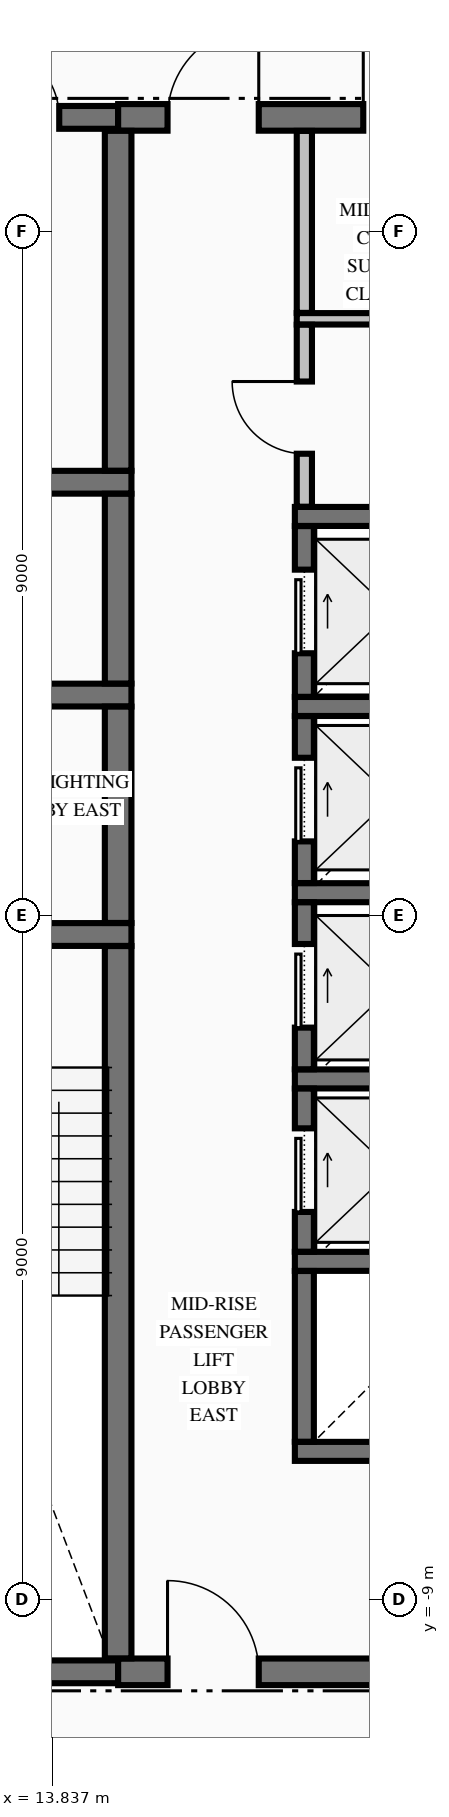
"""IFC4 building model, lengths in metres.
Left out: names, types, materials, properties, quantities, classifications, styles, units other than length and angle.
Written with IfcOpenShell. Run it as: python <this file> out.ifc"""

import sys

from ifc_helpers import new_model, si_unit, direction, frame, frame_2d, origin, place, context, subcontext, project, spatial, rectangle, extrude, element, fill, save


model = new_model("IFC4")
c1 = context("Model", 3, precision=1e-05, world=origin(), true_north=direction((0.0, 1.0)))
c2 = subcontext(c1, "Body", "Model", "MODEL_VIEW")
j1 = project(units=[si_unit("LENGTHUNIT", "METRE"), si_unit("PLANEANGLEUNIT", "RADIAN")], contexts=[c1])
p1 = place(None, origin())
s1 = spatial("IfcSite", under=j1, at=p1, CompositionType="ELEMENT")
p2 = place(p1, origin())
s2 = spatial("IfcBuilding", under=s1, at=p2, CompositionType="ELEMENT")
p3 = place(p2, frame((0.0, 0.0, 124.92)))
s3 = spatial("IfcBuildingStorey", under=s2, at=p3, CompositionType="ELEMENT", Elevation=124.92)
p4 = place(p3, frame((11.504, -9.95, 0.0), z_axis=(0.0, 0.0, 1.0), x_axis=(1.0, 0.0, 0.0)))
e1 = element("IfcWall", 1, at=p4, inside=s3, PredefinedType="SHEAR", context=c2, shape_type="SweptSolid", body=[
    extrude(rectangle(XDim=3.196, YDim=0.3, at=frame_2d((1.598, 0.0))), origin(), (0.0, 0.0, 1.0), 3.32),
])
p5 = place(p3, frame((14.7, -9.95, 0.0), z_axis=(0.0, 0.0, 1.0), x_axis=(1.0, 0.0, 0.0)))
e2 = element("IfcWall", 2, at=p5, inside=s3, PredefinedType="SHEAR", context=c2, shape_type="SweptSolid", body=[
    extrude(rectangle(XDim=4.796, YDim=0.35, at=frame_2d((2.398, 0.0))), origin(), (0.0, 0.0, 1.0), 3.32),
])
p6 = place(p5, frame((0.65, 0.0, 0.0)))
e3 = element("IfcOpeningElement", 3, at=p6, cuts=e2, PredefinedType="OPENING", context=c2, shape_type="SweptSolid", body=[
    extrude(rectangle(XDim=1.2, YDim=2.15, at=frame_2d((0.6, 1.075))), frame((0.0, 0.185, 0.0), z_axis=(0.0, -1.0, 0.0), x_axis=(1.0, 0.0, 0.0)), (0.0, 0.0, 1.0), 0.37),
])
for number, where, z_axis, x_axis in (
    (4, (17.025, -7.05, 0.0), (0.0, 0.0, 1.0), (1.0, 0.0, 0.0)),
    (5, (17.025, -4.55, 0.0), (0.0, 0.0, 1.0), (1.0, 0.0, 0.0)),
    (6, (17.025, -2.15, 0.0), (0.0, 0.0, 1.0), (1.0, 0.0, 0.0)),
):
    element("IfcWall", number, at=place(p3, frame(where, z_axis=z_axis, x_axis=x_axis)), inside=s3, PredefinedType="SOLIDWALL", context=c2, shape_type="SweptSolid", body=[
        extrude(rectangle(XDim=3.15, YDim=0.25, at=frame_2d((1.575, 0.0))), origin(), (0.0, 0.0, 1.0), 3.32),
    ])
p7 = place(p3, frame((11.504, -0.25, 0.0), z_axis=(0.0, 0.0, 1.0), x_axis=(1.0, 0.0, 0.0)))
e7 = element("IfcWall", 7, at=p7, inside=s3, PredefinedType="SHEAR", context=c2, shape_type="SweptSolid", body=[
    extrude(rectangle(XDim=3.371, YDim=0.3, at=frame_2d((1.686, 0.0))), origin(), (0.0, 0.0, 1.0), 3.32),
])
p8 = place(p7, frame((1.096, 0.0, 0.0)))
e8 = element("IfcOpeningElement", 8, at=p8, cuts=e7, PredefinedType="OPENING", context=c2, shape_type="SweptSolid", body=[
    extrude(rectangle(XDim=1.1, YDim=2.15, at=frame_2d((0.55, 1.075))), frame((0.0, 0.16, 0.0), z_axis=(0.0, -1.0, 0.0), x_axis=(1.0, 0.0, 0.0)), (0.0, 0.0, 1.0), 0.32),
])
p9 = place(p3, frame((17.025, 0.3, 0.0), z_axis=(0.0, 0.0, 1.0), x_axis=(1.0, 0.0, 0.0)))
e9 = element("IfcWall", 9, at=p9, inside=s3, PredefinedType="SOLIDWALL", context=c2, shape_type="SweptSolid", body=[
    extrude(rectangle(XDim=2.471, YDim=0.25, at=frame_2d((1.236, 0.0))), origin(), (0.0, 0.0, 1.0), 3.32),
])
p10 = place(p3, frame((17.025, 2.75, 0.0), z_axis=(0.0, 0.0, 1.0), x_axis=(1.0, 0.0, 0.0)))
e10 = element("IfcWall", 10, at=p10, inside=s3, PredefinedType="SOLIDWALL", context=c2, shape_type="SweptSolid", body=[
    extrude(rectangle(XDim=3.15, YDim=0.25, at=frame_2d((1.575, 0.0))), origin(), (0.0, 0.0, 1.0), 3.32),
])
p11 = place(p3, frame((10.85, 2.9, 0.0), z_axis=(0.0, 0.0, 1.0), x_axis=(1.0, 0.0, 0.0)))
e11 = element("IfcWall", 11, at=p11, inside=s3, PredefinedType="SHEAR", context=c2, shape_type="SweptSolid", body=[
    extrude(rectangle(XDim=4.025, YDim=0.3, at=frame_2d((2.012, 0.0))), origin(), (0.0, 0.0, 1.0), 3.32),
])
p12 = place(p11, frame((0.85, 0.0, 0.0)))
e12 = element("IfcOpeningElement", 12, at=p12, cuts=e11, PredefinedType="OPENING", context=c2, shape_type="SweptSolid", body=[
    extrude(rectangle(XDim=1.1, YDim=2.2, at=frame_2d((0.55, 1.1))), frame((0.0, 0.16, 0.0), z_axis=(0.0, -1.0, 0.0), x_axis=(1.0, 0.0, 0.0)), (0.0, 0.0, 1.0), 0.32),
])
p13 = place(p3, frame((17.025, 5.25, 0.0), z_axis=(0.0, 0.0, 1.0), x_axis=(1.0, 0.0, 0.0)))
e13 = element("IfcWall", 13, at=p13, inside=s3, PredefinedType="SOLIDWALL", context=c2, shape_type="SweptSolid", body=[
    extrude(rectangle(XDim=3.15, YDim=0.25, at=frame_2d((1.575, 0.0))), origin(), (0.0, 0.0, 1.0), 3.32),
])
p14 = place(p3, frame((10.85, 5.7, 0.0), z_axis=(0.0, 0.0, 1.0), x_axis=(1.0, 0.0, 0.0)))
e14 = element("IfcWall", 14, at=p14, inside=s3, PredefinedType="SHEAR", context=c2, shape_type="SweptSolid", body=[
    extrude(rectangle(XDim=4.025, YDim=0.3, at=frame_2d((2.012, 0.0))), origin(), (0.0, 0.0, 1.0), 3.32),
])
p15 = place(p3, frame((11.504, 10.5, 0.0), z_axis=(0.0, 0.0, 1.0), x_axis=(1.0, 0.0, 0.0)))
e15 = element("IfcWall", 15, at=p15, inside=s3, PredefinedType="SHEAR", context=c2, shape_type="SweptSolid", body=[
    extrude(rectangle(XDim=3.196, YDim=0.3, at=frame_2d((1.598, 0.0))), origin(), (0.0, 0.0, 1.0), 3.32),
])
p16 = place(p15, frame((1.471, 0.0, 0.0)))
e16 = element("IfcOpeningElement", 16, at=p16, cuts=e15, PredefinedType="OPENING", context=c2, shape_type="SweptSolid", body=[
    extrude(rectangle(XDim=0.95, YDim=2.15, at=frame_2d((0.475, 1.075))), frame((0.0, 0.16, 0.0), z_axis=(0.0, -1.0, 0.0), x_axis=(1.0, 0.0, 0.0)), (0.0, 0.0, 1.0), 0.32),
])
p17 = place(p3, frame((14.7, 10.5, 0.0), z_axis=(0.0, 0.0, 1.0), x_axis=(1.0, 0.0, 0.0)))
e17 = element("IfcWall", 17, at=p17, inside=s3, PredefinedType="SHEAR", context=c2, shape_type="SweptSolid", body=[
    extrude(rectangle(XDim=4.796, YDim=0.35, at=frame_2d((2.398, 0.0))), origin(), (0.0, 0.0, 1.0), 3.32),
])
p18 = place(p17, frame((0.65, 0.0, 0.0)))
e18 = element("IfcOpeningElement", 18, at=p18, cuts=e17, PredefinedType="OPENING", context=c2, shape_type="SweptSolid", body=[
    extrude(rectangle(XDim=1.2, YDim=2.15, at=frame_2d((0.6, 1.075))), frame((0.0, 0.185, 0.0), z_axis=(0.0, -1.0, 0.0), x_axis=(1.0, 0.0, 0.0)), (0.0, 0.0, 1.0), 0.37),
])
p19 = place(p17, frame((3.225, 0.0, 0.0)))
e19 = element("IfcOpeningElement", 19, at=p19, cuts=e17, PredefinedType="OPENING", context=c2, shape_type="SweptSolid", body=[
    extrude(rectangle(XDim=0.95, YDim=2.15, at=frame_2d((0.475, 1.075))), frame((0.0, 0.185, 0.0), z_axis=(0.0, -1.0, 0.0), x_axis=(1.0, 0.0, 0.0)), (0.0, 0.0, 1.0), 0.37),
])
p20 = place(p3, frame((17.05, 7.85, 0.0), z_axis=(0.0, 0.0, 1.0), x_axis=(1.0, 0.0, 0.0)))
e20 = element("IfcWall", 20, at=p20, inside=s3, PredefinedType="PARTITIONING", context=c2, shape_type="SweptSolid", body=[
    extrude(rectangle(XDim=2.772, YDim=0.15, at=frame_2d((1.386, 0.0))), origin(), (0.0, 0.0, 1.0), 3.32),
])
p21 = place(p3, frame((14.7, -9.773, 0.0), z_axis=(0.0, 0.0, 1.0), x_axis=(0.0, 1.0, 0.0)))
e21 = element("IfcWall", 21, at=p21, inside=s3, PredefinedType="SHEAR", context=c2, shape_type="SweptSolid", body=[
    extrude(rectangle(XDim=9.371, YDim=0.35, at=frame_2d((4.686, 0.0))), origin(), (0.0, 0.0, 1.0), 3.32),
])
p22 = place(p3, frame((14.7, -0.098, 0.0), z_axis=(0.0, 0.0, 1.0), x_axis=(0.0, 1.0, 0.0)))
e22 = element("IfcWall", 22, at=p22, inside=s3, PredefinedType="SHEAR", context=c2, shape_type="SweptSolid", body=[
    extrude(rectangle(XDim=2.846, YDim=0.35, at=frame_2d((1.423, 0.0))), origin(), (0.0, 0.0, 1.0), 3.32),
])
p23 = place(p3, frame((14.7, 3.052, 0.0), z_axis=(0.0, 0.0, 1.0), x_axis=(0.0, 1.0, 0.0)))
e23 = element("IfcWall", 23, at=p23, inside=s3, PredefinedType="SHEAR", context=c2, shape_type="SweptSolid", body=[
    extrude(rectangle(XDim=2.496, YDim=0.35, at=frame_2d((1.248, 0.0))), origin(), (0.0, 0.0, 1.0), 3.32),
])
p24 = place(p3, frame((14.7, 5.852, 0.0), z_axis=(0.0, 0.0, 1.0), x_axis=(0.0, 1.0, 0.0)))
e24 = element("IfcWall", 24, at=p24, inside=s3, PredefinedType="SHEAR", context=c2, shape_type="SweptSolid", body=[
    extrude(rectangle(XDim=4.471, YDim=0.35, at=frame_2d((2.235, 0.0))), origin(), (0.0, 0.0, 1.0), 3.32),
])
p25 = place(p3, frame((17.15, -6.923, 0.0), z_axis=(0.0, 0.0, 1.0), x_axis=(0.0, 1.0, 0.0)))
e25 = element("IfcWall", 25, at=p25, inside=s3, PredefinedType="SOLIDWALL", context=c2, shape_type="SweptSolid", body=[
    extrude(rectangle(XDim=2.246, YDim=0.25, at=frame_2d((1.123, 0.0))), origin(), (0.0, 0.0, 1.0), 3.32),
])
p26 = place(p3, frame((17.15, -4.423, 0.0), z_axis=(0.0, 0.0, 1.0), x_axis=(0.0, 1.0, 0.0)))
e26 = element("IfcWall", 26, at=p26, inside=s3, PredefinedType="SOLIDWALL", context=c2, shape_type="SweptSolid", body=[
    extrude(rectangle(XDim=2.146, YDim=0.25, at=frame_2d((1.073, 0.0))), origin(), (0.0, 0.0, 1.0), 3.32),
])
p27 = place(p26, frame((0.523, 0.0, 0.0)))
e27 = element("IfcOpeningElement", 27, at=p27, cuts=e26, PredefinedType="OPENING", context=c2, shape_type="SweptSolid", body=[
    extrude(rectangle(XDim=1.1, YDim=2.2, at=frame_2d((0.55, 1.1))), frame((0.0, 0.135, 0.0), z_axis=(0.0, -1.0, 0.0), x_axis=(1.0, 0.0, 0.0)), (0.0, 0.0, 1.0), 0.27),
])
p28 = place(p3, frame((17.15, -2.023, 0.0), z_axis=(0.0, 0.0, 1.0), x_axis=(0.0, 1.0, 0.0)))
e28 = element("IfcWall", 28, at=p28, inside=s3, PredefinedType="SOLIDWALL", context=c2, shape_type="SweptSolid", body=[
    extrude(rectangle(XDim=2.196, YDim=0.25, at=frame_2d((1.098, 0.0))), origin(), (0.0, 0.0, 1.0), 3.32),
])
p29 = place(p28, frame((0.548, 0.0, 0.0)))
e29 = element("IfcOpeningElement", 29, at=p29, cuts=e28, PredefinedType="OPENING", context=c2, shape_type="SweptSolid", body=[
    extrude(rectangle(XDim=1.1, YDim=2.2, at=frame_2d((0.55, 1.1))), frame((0.0, 0.135, 0.0), z_axis=(0.0, -1.0, 0.0), x_axis=(1.0, 0.0, 0.0)), (0.0, 0.0, 1.0), 0.27),
])
p30 = place(p3, frame((17.15, 0.427, 0.0), z_axis=(0.0, 0.0, 1.0), x_axis=(0.0, 1.0, 0.0)))
e30 = element("IfcWall", 30, at=p30, inside=s3, PredefinedType="SOLIDWALL", context=c2, shape_type="SweptSolid", body=[
    extrude(rectangle(XDim=2.196, YDim=0.25, at=frame_2d((1.098, 0.0))), origin(), (0.0, 0.0, 1.0), 3.32),
])
p31 = place(p30, frame((0.548, 0.0, 0.0)))
e31 = element("IfcOpeningElement", 31, at=p31, cuts=e30, PredefinedType="OPENING", context=c2, shape_type="SweptSolid", body=[
    extrude(rectangle(XDim=1.1, YDim=2.2, at=frame_2d((0.55, 1.1))), frame((0.0, 0.135, 0.0), z_axis=(0.0, -1.0, 0.0), x_axis=(1.0, 0.0, 0.0)), (0.0, 0.0, 1.0), 0.27),
])
p32 = place(p3, frame((17.15, 2.877, 0.0), z_axis=(0.0, 0.0, 1.0), x_axis=(0.0, 1.0, 0.0)))
e32 = element("IfcWall", 32, at=p32, inside=s3, PredefinedType="SOLIDWALL", context=c2, shape_type="SweptSolid", body=[
    extrude(rectangle(XDim=2.246, YDim=0.25, at=frame_2d((1.123, 0.0))), origin(), (0.0, 0.0, 1.0), 3.32),
])
p33 = place(p32, frame((0.573, 0.0, 0.0)))
e33 = element("IfcOpeningElement", 33, at=p33, cuts=e32, PredefinedType="OPENING", context=c2, shape_type="SweptSolid", body=[
    extrude(rectangle(XDim=1.1, YDim=2.2, at=frame_2d((0.55, 1.1))), frame((0.0, 0.135, 0.0), z_axis=(0.0, -1.0, 0.0), x_axis=(1.0, 0.0, 0.0)), (0.0, 0.0, 1.0), 0.27),
])
p34 = place(p3, frame((17.15, 5.378, 0.0), z_axis=(0.0, 0.0, 1.0), x_axis=(0.0, 1.0, 0.0)))
e34 = element("IfcWall", 34, at=p34, inside=s3, PredefinedType="PARTITIONING", context=c2, shape_type="SweptSolid", body=[
    extrude(rectangle(XDim=2.394, YDim=0.2, at=frame_2d((1.197, 0.0))), origin(), (0.0, 0.0, 1.0), 3.32),
])
p35 = place(p34, frame((0.697, 0.0, 0.0)))
e35 = element("IfcOpeningElement", 35, at=p35, cuts=e34, PredefinedType="OPENING", context=c2, shape_type="SweptSolid", body=[
    extrude(rectangle(XDim=0.95, YDim=2.15, at=frame_2d((0.475, 1.075))), frame((0.0, 0.11, 0.0), z_axis=(0.0, -1.0, 0.0), x_axis=(1.0, 0.0, 0.0)), (0.0, 0.0, 1.0), 0.22),
])
p36 = place(p3, frame((17.15, 7.928, 0.0), z_axis=(0.0, 0.0, 1.0), x_axis=(0.0, 1.0, 0.0)))
e36 = element("IfcWall", 36, at=p36, inside=s3, PredefinedType="PARTITIONING", context=c2, shape_type="SweptSolid", body=[
    extrude(rectangle(XDim=2.394, YDim=0.2, at=frame_2d((1.197, 0.0))), origin(), (0.0, 0.0, 1.0), 3.32),
])
p37 = place(p16, origin())
e37 = element("IfcDoor", 37, at=p37, inside=s3, OperationType="SINGLE_SWING_LEFT", PredefinedType="DOOR", context=c2, shape_type="SweptSolid", body=[
    extrude(rectangle(XDim=0.95, YDim=2.15, at=frame_2d((0.475, 1.075))), frame((0.0, 0.025, 0.0), z_axis=(0.0, -1.0, 0.0), x_axis=(1.0, 0.0, 0.0)), (0.0, 0.0, 1.0), 0.05),
])
fill(e16, e37)
p38 = place(p27, origin())
e38 = element("IfcDoor", 38, at=p38, inside=s3, OperationType="SLIDING_TO_RIGHT", PredefinedType="DOOR", context=c2, shape_type="SweptSolid", body=[
    extrude(rectangle(XDim=1.1, YDim=2.2, at=frame_2d((0.55, 1.1))), frame((0.0, 0.025, 0.0), z_axis=(0.0, -1.0, 0.0), x_axis=(1.0, 0.0, 0.0)), (0.0, 0.0, 1.0), 0.05),
])
fill(e27, e38)
p39 = place(p29, origin())
e39 = element("IfcDoor", 39, at=p39, inside=s3, OperationType="SLIDING_TO_RIGHT", PredefinedType="DOOR", context=c2, shape_type="SweptSolid", body=[
    extrude(rectangle(XDim=1.1, YDim=2.2, at=frame_2d((0.55, 1.1))), frame((0.0, 0.025, 0.0), z_axis=(0.0, -1.0, 0.0), x_axis=(1.0, 0.0, 0.0)), (0.0, 0.0, 1.0), 0.05),
])
fill(e29, e39)
p40 = place(p31, origin())
e40 = element("IfcDoor", 40, at=p40, inside=s3, OperationType="SLIDING_TO_RIGHT", PredefinedType="DOOR", context=c2, shape_type="SweptSolid", body=[
    extrude(rectangle(XDim=1.1, YDim=2.2, at=frame_2d((0.55, 1.1))), frame((0.0, 0.025, 0.0), z_axis=(0.0, -1.0, 0.0), x_axis=(1.0, 0.0, 0.0)), (0.0, 0.0, 1.0), 0.05),
])
fill(e31, e40)
p41 = place(p33, origin())
e41 = element("IfcDoor", 41, at=p41, inside=s3, OperationType="SLIDING_TO_RIGHT", PredefinedType="DOOR", context=c2, shape_type="SweptSolid", body=[
    extrude(rectangle(XDim=1.1, YDim=2.2, at=frame_2d((0.55, 1.1))), frame((0.0, 0.025, 0.0), z_axis=(0.0, -1.0, 0.0), x_axis=(1.0, 0.0, 0.0)), (0.0, 0.0, 1.0), 0.05),
])
fill(e33, e41)
p42 = place(p6, origin())
e42 = element("IfcDoor", 42, at=p42, inside=s3, OperationType="SINGLE_SWING_LEFT", PredefinedType="DOOR", context=c2, shape_type="SweptSolid", body=[
    extrude(rectangle(XDim=1.2, YDim=2.15, at=frame_2d((0.6, 1.075))), frame((0.0, 0.025, 0.0), z_axis=(0.0, -1.0, 0.0), x_axis=(1.0, 0.0, 0.0)), (0.0, 0.0, 1.0), 0.05),
])
fill(e3, e42)
p43 = place(p18, origin())
e43 = element("IfcDoor", 43, at=p43, inside=s3, OperationType="SINGLE_SWING_RIGHT", PredefinedType="DOOR", context=c2, shape_type="SweptSolid", body=[
    extrude(rectangle(XDim=1.2, YDim=2.15, at=frame_2d((0.6, 1.075))), frame((0.0, 0.025, 0.0), z_axis=(0.0, -1.0, 0.0), x_axis=(1.0, 0.0, 0.0)), (0.0, 0.0, 1.0), 0.05),
])
fill(e18, e43)
p44 = place(p19, origin())
e44 = element("IfcDoor", 44, at=p44, inside=s3, OperationType="SINGLE_SWING_LEFT", PredefinedType="DOOR", context=c2, shape_type="SweptSolid", body=[
    extrude(rectangle(XDim=0.95, YDim=2.15, at=frame_2d((0.475, 1.075))), frame((0.0, 0.025, 0.0), z_axis=(0.0, -1.0, 0.0), x_axis=(1.0, 0.0, 0.0)), (0.0, 0.0, 1.0), 0.05),
])
fill(e19, e44)
p45 = place(p35, origin())
e45 = element("IfcDoor", 45, at=p45, inside=s3, OperationType="SINGLE_SWING_RIGHT", PredefinedType="DOOR", context=c2, shape_type="SweptSolid", body=[
    extrude(rectangle(XDim=0.95, YDim=2.15, at=frame_2d((0.475, 1.075))), frame((0.0, 0.025, 0.0), z_axis=(0.0, -1.0, 0.0), x_axis=(1.0, 0.0, 0.0)), (0.0, 0.0, 1.0), 0.05),
])
fill(e35, e45)
save(model, sys.argv[1])
